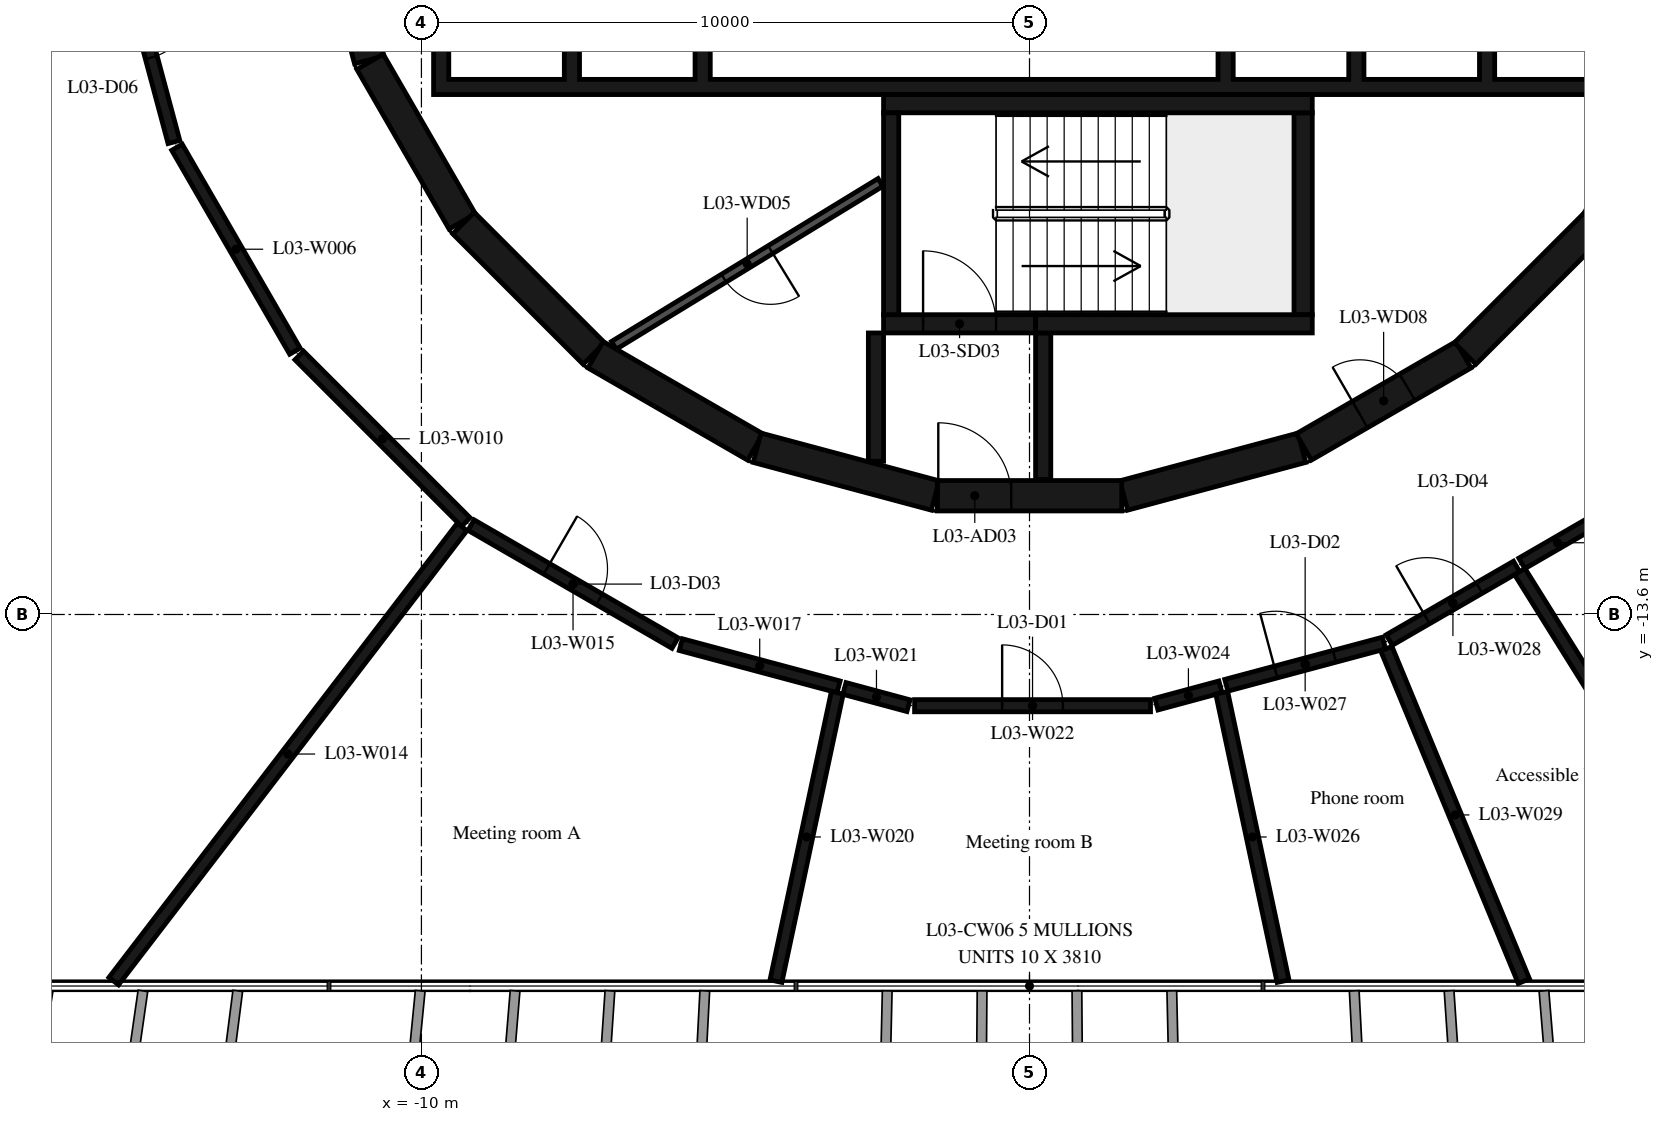
"""IFC4 building model, lengths in metres.
Left out: names, types, materials, properties, quantities, classifications, styles, units other than length and angle.
Written with IfcOpenShell. Run it as: python <this file> out.ifc"""

import sys

from ifc_helpers import new_model, si_unit, direction, frame, frame_2d, origin, place, context, subcontext, project, spatial, polyline, rectangle, outline, extrude, element, fill, save


model = new_model("IFC4")
c1 = context("Model", 3, precision=1e-05, world=origin(), true_north=direction((0.0, 1.0)))
c2 = subcontext(c1, "Body", "Model", "MODEL_VIEW")
j1 = project(units=[si_unit("LENGTHUNIT", "METRE"), si_unit("PLANEANGLEUNIT", "RADIAN")], contexts=[c1])
p1 = place(None, origin())
s1 = spatial("IfcSite", under=j1, at=p1, CompositionType="ELEMENT")
p2 = place(p1, origin())
s2 = spatial("IfcBuilding", under=s1, at=p2, CompositionType="ELEMENT")
p3 = place(p2, frame((0.0, 0.0, 18.6)))
s3 = spatial("IfcBuildingStorey", under=s2, at=p3, CompositionType="ELEMENT", Elevation=18.6)
p4 = place(p3, frame((1.55, -11.643, 0.0), z_axis=(0.0, 0.0, 1.0), x_axis=(0.965948410781, 0.258734743916, 0.0)))
e1 = element("IfcWall", 1, at=p4, inside=s3, PredefinedType="SHEAR", context=c2, shape_type="SweptSolid", body=[
    extrude(rectangle(XDim=3.033, YDim=0.5, at=frame_2d((1.516, 0.0))), origin(), (0.0, 0.0, 1.0), 4.42),
])
p5 = place(p3, frame((4.51, -10.845, 0.0), z_axis=(0.0, 0.0, 1.0), x_axis=(0.865975092491, 0.500087131594, 0.0)))
e2 = element("IfcWall", 2, at=p5, inside=s3, PredefinedType="SHEAR", context=c2, shape_type="SweptSolid", body=[
    extrude(rectangle(XDim=3.033, YDim=0.5, at=frame_2d((1.516, 0.0))), origin(), (0.0, 0.0, 1.0), 4.42),
])
p6 = place(p5, frame((1.066, 0.0, 0.0)))
e3 = element("IfcOpeningElement", 3, at=p6, cuts=e2, PredefinedType="OPENING", context=c2, shape_type="SweptSolid", body=[
    extrude(rectangle(XDim=0.9, YDim=2.1, at=frame_2d((0.45, 1.05))), frame((0.0, 0.26, 0.0), z_axis=(0.0, -1.0, 0.0), x_axis=(1.0, 0.0, 0.0)), (0.0, 0.0, 1.0), 0.52),
])
p7 = place(p3, frame((7.164, -9.308, 0.0), z_axis=(0.0, 0.0, 1.0), x_axis=(0.707106781187, 0.707106781187, 0.0)))
e4 = element("IfcWall", 4, at=p7, inside=s3, PredefinedType="SHEAR", context=c2, shape_type="SweptSolid", body=[
    extrude(rectangle(XDim=3.032, YDim=0.5, at=frame_2d((1.516, 0.0))), origin(), (0.0, 0.0, 1.0), 4.42),
])
p8 = place(p3, frame((9.329, -7.137, 0.0), z_axis=(0.0, 0.0, 1.0), x_axis=(0.500087131594, 0.865975092491, 0.0)))
e5 = element("IfcWall", 5, at=p8, inside=s3, PredefinedType="SHEAR", context=c2, shape_type="SweptSolid", body=[
    extrude(rectangle(XDim=3.033, YDim=0.5, at=frame_2d((1.516, 0.0))), origin(), (0.0, 0.0, 1.0), 4.42),
])
p9 = place(p3, frame((-11.643, -1.55, 0.0), z_axis=(0.0, 0.0, 1.0), x_axis=(0.258734743916, -0.965948410781, 0.0)))
e6 = element("IfcWall", 6, at=p9, inside=s3, PredefinedType="SHEAR", context=c2, shape_type="SweptSolid", body=[
    extrude(rectangle(XDim=3.033, YDim=0.5, at=frame_2d((1.516, 0.0))), origin(), (0.0, 0.0, 1.0), 4.42),
])
p10 = place(p9, frame((1.066, 0.0, 0.0)))
e7 = element("IfcOpeningElement", 7, at=p10, cuts=e6, PredefinedType="OPENING", context=c2, shape_type="SweptSolid", body=[
    extrude(rectangle(XDim=0.9, YDim=2.1, at=frame_2d((0.45, 1.05))), frame((0.0, 0.26, 0.0), z_axis=(0.0, -1.0, 0.0), x_axis=(1.0, 0.0, 0.0)), (0.0, 0.0, 1.0), 0.52),
])
p11 = place(p3, frame((-10.845, -4.51, 0.0), z_axis=(0.0, 0.0, 1.0), x_axis=(0.500087131594, -0.865975092491, 0.0)))
e8 = element("IfcWall", 8, at=p11, inside=s3, PredefinedType="SHEAR", context=c2, shape_type="SweptSolid", body=[
    extrude(rectangle(XDim=3.033, YDim=0.5, at=frame_2d((1.516, 0.0))), origin(), (0.0, 0.0, 1.0), 4.42),
])
p12 = place(p3, frame((-9.308, -7.164, 0.0), z_axis=(0.0, 0.0, 1.0), x_axis=(0.707106781187, -0.707106781187, 0.0)))
e9 = element("IfcWall", 9, at=p12, inside=s3, PredefinedType="SHEAR", context=c2, shape_type="SweptSolid", body=[
    extrude(rectangle(XDim=3.032, YDim=0.5, at=frame_2d((1.516, 0.0))), origin(), (0.0, 0.0, 1.0), 4.42),
])
for number, where, z_axis, x_axis in (
    (10, (-7.137, -9.329, 0.0), (0.0, 0.0, 1.0), (0.866, -0.5, 0.0)),
    (11, (-4.479, -10.858, 0.0), (0.0, 0.0, 1.0), (0.966, -0.259, 0.0)),
):
    element("IfcWall", number, at=place(p3, frame(where, z_axis=z_axis, x_axis=x_axis)), inside=s3, PredefinedType="SHEAR", context=c2, shape_type="SweptSolid", body=[
        extrude(rectangle(XDim=3.033, YDim=0.5, at=frame_2d((1.516, 0.0))), origin(), (0.0, 0.0, 1.0), 4.42),
    ])
p13 = place(p3, frame((-1.516, -11.647, 0.0), z_axis=(0.0, 0.0, 1.0), x_axis=(1.0, 0.0, 0.0)))
e12 = element("IfcWall", 12, at=p13, inside=s3, PredefinedType="SHEAR", context=c2, shape_type="SweptSolid", body=[
    extrude(rectangle(XDim=3.033, YDim=0.5, at=frame_2d((1.516, 0.0))), origin(), (0.0, 0.0, 1.0), 4.42),
])
p14 = place(p13, frame((0.016, 0.0, 0.0)))
e13 = element("IfcOpeningElement", 13, at=p14, cuts=e12, PredefinedType="OPENING", context=c2, shape_type="SweptSolid", body=[
    extrude(rectangle(XDim=1.2, YDim=2.1, at=frame_2d((0.6, 1.05))), frame((0.0, 0.26, 0.0), z_axis=(0.0, -1.0, 0.0), x_axis=(1.0, 0.0, 0.0)), (0.0, 0.0, 1.0), 0.52),
])
p15 = place(p3, frame((-2.275, -8.67, 0.0), z_axis=(0.0, 0.0, 1.0), x_axis=(0.0, 1.0, 0.0)))
e14 = element("IfcWall", 14, at=p15, inside=s3, PredefinedType="SHEAR", context=c2, shape_type="SweptSolid", body=[
    extrude(rectangle(XDim=3.32, YDim=0.25, at=frame_2d((1.66, 0.0))), origin(), (0.0, 0.0, 1.0), 4.42),
])
p16 = place(p3, frame((-2.4, -5.2, 0.0), z_axis=(0.0, 0.0, 1.0), x_axis=(1.0, 0.0, 0.0)))
e15 = element("IfcWall", 15, at=p16, inside=s3, PredefinedType="SHEAR", context=c2, shape_type="SweptSolid", body=[
    extrude(rectangle(XDim=7.05, YDim=0.3, at=frame_2d((3.525, 0.0))), origin(), (0.0, 0.0, 1.0), 4.42),
])
p17 = place(p3, frame((4.5, -8.67, 0.0), z_axis=(0.0, 0.0, 1.0), x_axis=(0.0, 1.0, 0.0)))
e16 = element("IfcWall", 16, at=p17, inside=s3, PredefinedType="SHEAR", context=c2, shape_type="SweptSolid", body=[
    extrude(rectangle(XDim=3.32, YDim=0.3, at=frame_2d((1.66, 0.0))), origin(), (0.0, 0.0, 1.0), 4.42),
])
p18 = place(p3, frame((0.1, -8.82, 0.0), z_axis=(0.0, 0.0, 1.0), x_axis=(1.0, 0.0, 0.0)))
e17 = element("IfcWall", 17, at=p18, inside=s3, PredefinedType="SHEAR", context=c2, shape_type="SweptSolid", body=[
    extrude(rectangle(XDim=4.55, YDim=0.3, at=frame_2d((2.275, 0.0))), origin(), (0.0, 0.0, 1.0), 4.42),
])
p19 = place(p3, frame((-2.4, -8.82, 0.0), z_axis=(0.0, 0.0, 1.0), x_axis=(1.0, 0.0, 0.0)))
e18 = element("IfcWall", 18, at=p19, inside=s3, PredefinedType="SHEAR", context=c2, shape_type="SweptSolid", body=[
    extrude(rectangle(XDim=2.5, YDim=0.3, at=frame_2d((1.25, 0.0))), origin(), (0.0, 0.0, 1.0), 4.42),
])
p20 = place(p19, frame((0.65, 0.0, 0.0)))
e19 = element("IfcOpeningElement", 19, at=p20, cuts=e18, PredefinedType="OPENING", context=c2, shape_type="SweptSolid", body=[
    extrude(rectangle(XDim=1.2, YDim=2.1, at=frame_2d((0.6, 1.05))), frame((0.0, 0.16, 0.0), z_axis=(0.0, -1.0, 0.0), x_axis=(1.0, 0.0, 0.0)), (0.0, 0.0, 1.0), 0.32),
])
p21 = place(p3, frame((-2.525, -8.97, 0.0), z_axis=(0.0, 0.0, 1.0), x_axis=(0.0, -1.0, 0.0)))
e20 = element("IfcWall", 20, at=p21, inside=s3, PredefinedType="SHEAR", context=c2, shape_type="SweptSolid", body=[
    extrude(rectangle(XDim=2.11, YDim=0.25, at=frame_2d((1.055, 0.0))), origin(), (0.0, 0.0, 1.0), 4.42),
])
p22 = place(p3, frame((0.225, -8.97, 0.0), z_axis=(0.0, 0.0, 1.0), x_axis=(0.0, -1.0, 0.0)))
e21 = element("IfcWall", 21, at=p22, inside=s3, PredefinedType="SHEAR", context=c2, shape_type="SweptSolid", body=[
    extrude(rectangle(XDim=2.41, YDim=0.25, at=frame_2d((1.205, 0.0))), origin(), (0.0, 0.0, 1.0), 4.42),
])
p23 = place(p3, origin())
e22 = element("IfcWall", 22, at=p23, inside=s3, PredefinedType="SHEAR", context=c2, shape_type="SweptSolid", body=[
    extrude(outline(polyline([(9.8, -5.05), (9.8, -4.8), (9.8, -1.9), (9.55, -1.9), (9.55, -4.8), (7.65, -4.8), (7.65, -1.9), (7.4, -1.9), (7.4, -4.8), (5.5, -4.8), (5.5, -1.9), (5.25, -1.9), (5.25, -4.8), (3.35, -4.8), (3.35, -1.9), (3.1, -1.9), (3.1, -4.8), (-5.25, -4.8), (-5.25, -1.9), (-5.5, -1.9), (-5.5, -4.8), (-7.4, -4.8), (-7.4, -1.9), (-7.65, -1.9), (-7.65, -4.8), (-9.55, -4.8), (-9.55, -1.9), (-9.8, -1.9), (-9.8, -4.8), (-9.8, -5.05), (9.8, -5.05)])), origin(), (0.0, 0.0, 1.0), 4.42),
])
p24 = place(p3, frame((-2.451, -6.495, 0.0), z_axis=(0.0, 0.0, 1.0), x_axis=(-0.853250115418, -0.521501908471, 0.0)))
e23 = element("IfcWall", 23, at=p24, inside=s3, PredefinedType="PARTITIONING", context=c2, shape_type="SweptSolid", body=[
    extrude(rectangle(XDim=5.137, YDim=0.15, at=frame_2d((2.569, 0.0))), origin(), (0.0, 0.0, 1.0), 4.42),
])
p25 = place(p24, frame((2.119, 0.0, 0.0)))
e24 = element("IfcOpeningElement", 24, at=p25, cuts=e23, PredefinedType="OPENING", context=c2, shape_type="SweptSolid", body=[
    extrude(rectangle(XDim=0.9, YDim=2.1, at=frame_2d((0.45, 1.05))), frame((0.0, 0.085, 0.0), z_axis=(0.0, -1.0, 0.0), x_axis=(1.0, 0.0, 0.0)), (0.0, 0.0, 1.0), 0.17),
])
p26 = place(p3, frame((-15.074, -2.087, 0.0), z_axis=(0.0, 0.0, 1.0), x_axis=(0.259026804199, -0.965870133458, 0.0)))
e25 = element("IfcWall", 25, at=p26, inside=s3, PredefinedType="PARTITIONING", context=c2, shape_type="SweptSolid", body=[
    extrude(rectangle(XDim=3.876, YDim=0.2, at=frame_2d((1.938, 0.0))), origin(), (0.0, 0.0, 1.0), 4.42),
])
p27 = place(p26, frame((1.438, 0.0, 0.0)))
e26 = element("IfcOpeningElement", 26, at=p27, cuts=e25, PredefinedType="OPENING", context=c2, shape_type="SweptSolid", body=[
    extrude(rectangle(XDim=1.0, YDim=2.1, at=frame_2d((0.5, 1.05))), frame((0.0, 0.11, 0.0), z_axis=(0.0, -1.0, 0.0), x_axis=(1.0, 0.0, 0.0)), (0.0, 0.0, 1.0), 0.22),
])
p28 = place(p3, frame((-14.02, -5.917, 0.0), z_axis=(0.0, 0.0, 1.0), x_axis=(0.500733182901, -0.865601686425, 0.0)))
e27 = element("IfcWall", 27, at=p28, inside=s3, PredefinedType="PARTITIONING", context=c2, shape_type="SweptSolid", body=[
    extrude(rectangle(XDim=3.874, YDim=0.2, at=frame_2d((1.937, 0.0))), origin(), (0.0, 0.0, 1.0), 4.42),
])
p29 = place(p3, frame((-12.009, -9.341, 0.0), z_axis=(0.0, 0.0, 1.0), x_axis=(0.707106781187, -0.707106781187, 0.0)))
e28 = element("IfcWall", 28, at=p29, inside=s3, PredefinedType="PARTITIONING", context=c2, shape_type="SweptSolid", body=[
    extrude(rectangle(XDim=3.874, YDim=0.2, at=frame_2d((1.937, 0.0))), origin(), (0.0, 0.0, 1.0), 4.42),
])
p30 = place(p3, frame((-9.331, -12.159, 0.0), z_axis=(0.0, 0.0, 1.0), x_axis=(-0.608558385637, -0.793509099677, 0.0)))
e29 = element("IfcWall", 29, at=p30, inside=s3, PredefinedType="PARTITIONING", context=c2, shape_type="SweptSolid", body=[
    extrude(rectangle(XDim=9.415, YDim=0.2, at=frame_2d((4.707, 0.0))), origin(), (0.0, 0.0, 1.0), 4.42),
])
p31 = place(p3, frame((-9.183, -12.13, 0.0), z_axis=(0.0, 0.0, 1.0), x_axis=(0.865585884642, -0.500760497952, 0.0)))
e30 = element("IfcWall", 30, at=p31, inside=s3, PredefinedType="PARTITIONING", context=c2, shape_type="SweptSolid", body=[
    extrude(rectangle(XDim=3.874, YDim=0.2, at=frame_2d((1.937, 0.0))), origin(), (0.0, 0.0, 1.0), 4.42),
])
p32 = place(p31, frame((1.437, 0.0, 0.0)))
e31 = element("IfcOpeningElement", 31, at=p32, cuts=e30, PredefinedType="OPENING", context=c2, shape_type="SweptSolid", body=[
    extrude(rectangle(XDim=1.0, YDim=2.1, at=frame_2d((0.5, 1.05))), frame((0.0, 0.11, 0.0), z_axis=(0.0, -1.0, 0.0), x_axis=(1.0, 0.0, 0.0)), (0.0, 0.0, 1.0), 0.22),
])
p33 = place(p3, frame((-5.733, -14.096, 0.0), z_axis=(0.0, 0.0, 1.0), x_axis=(0.966003629213, -0.25852850587, 0.0)))
e32 = element("IfcWall", 32, at=p33, inside=s3, PredefinedType="PARTITIONING", context=c2, shape_type="SweptSolid", body=[
    extrude(rectangle(XDim=2.685, YDim=0.2, at=frame_2d((1.342, 0.0))), origin(), (0.0, 0.0, 1.0), 4.42),
])
p34 = place(p3, frame((-3.161, -14.888, 0.0), z_axis=(0.0, 0.0, 1.0), x_axis=(-0.208118919353, -0.978103530005, 0.0)))
e33 = element("IfcWall", 33, at=p34, inside=s3, PredefinedType="PARTITIONING", context=c2, shape_type="SweptSolid", body=[
    extrude(rectangle(XDim=4.848, YDim=0.2, at=frame_2d((2.424, 0.0))), origin(), (0.0, 0.0, 1.0), 4.42),
])
p35 = place(p3, frame((-3.043, -14.816, 0.0), z_axis=(0.0, 0.0, 1.0), x_axis=(0.965488181203, -0.260446869738, 0.0)))
e34 = element("IfcWall", 34, at=p35, inside=s3, PredefinedType="PARTITIONING", context=c2, shape_type="SweptSolid", body=[
    extrude(rectangle(XDim=1.091, YDim=0.2, at=frame_2d((0.545, 0.0))), origin(), (0.0, 0.0, 1.0), 4.42),
])
p36 = place(p3, frame((-1.89, -15.1, 0.0), z_axis=(0.0, 0.0, 1.0), x_axis=(1.0, 0.0, 0.0)))
e35 = element("IfcWall", 35, at=p36, inside=s3, PredefinedType="PARTITIONING", context=c2, shape_type="SweptSolid", body=[
    extrude(rectangle(XDim=3.88, YDim=0.2, at=frame_2d((1.94, 0.0))), origin(), (0.0, 0.0, 1.0), 4.42),
])
p37 = place(p36, frame((1.44, 0.0, 0.0)))
e36 = element("IfcOpeningElement", 36, at=p37, cuts=e35, PredefinedType="OPENING", context=c2, shape_type="SweptSolid", body=[
    extrude(rectangle(XDim=1.0, YDim=2.1, at=frame_2d((0.5, 1.05))), frame((0.0, 0.11, 0.0), z_axis=(0.0, -1.0, 0.0), x_axis=(1.0, 0.0, 0.0)), (0.0, 0.0, 1.0), 0.22),
])
p38 = place(p3, frame((2.087, -15.074, 0.0), z_axis=(0.0, 0.0, 1.0), x_axis=(0.965529267024, 0.260294514963, 0.0)))
e37 = element("IfcWall", 37, at=p38, inside=s3, PredefinedType="PARTITIONING", context=c2, shape_type="SweptSolid", body=[
    extrude(rectangle(XDim=1.091, YDim=0.2, at=frame_2d((0.545, 0.0))), origin(), (0.0, 0.0, 1.0), 4.42),
])
p39 = place(p3, frame((3.161, -14.888, 0.0), z_axis=(0.0, 0.0, 1.0), x_axis=(0.208118919353, -0.978103530005, 0.0)))
e38 = element("IfcWall", 38, at=p39, inside=s3, PredefinedType="PARTITIONING", context=c2, shape_type="SweptSolid", body=[
    extrude(rectangle(XDim=4.848, YDim=0.2, at=frame_2d((2.424, 0.0))), origin(), (0.0, 0.0, 1.0), 4.42),
])
p40 = place(p3, frame((3.237, -14.764, 0.0), z_axis=(0.0, 0.0, 1.0), x_axis=(0.966003629213, 0.25852850587, 0.0)))
e39 = element("IfcWall", 39, at=p40, inside=s3, PredefinedType="PARTITIONING", context=c2, shape_type="SweptSolid", body=[
    extrude(rectangle(XDim=2.685, YDim=0.2, at=frame_2d((1.342, 0.0))), origin(), (0.0, 0.0, 1.0), 4.42),
])
p41 = place(p40, frame((0.842, 0.0, 0.0)))
e40 = element("IfcOpeningElement", 40, at=p41, cuts=e39, PredefinedType="OPENING", context=c2, shape_type="SweptSolid", body=[
    extrude(rectangle(XDim=1.0, YDim=2.1, at=frame_2d((0.5, 1.05))), frame((0.0, 0.11, 0.0), z_axis=(0.0, -1.0, 0.0), x_axis=(1.0, 0.0, 0.0)), (0.0, 0.0, 1.0), 0.22),
])
p42 = place(p3, frame((5.917, -14.02, 0.0), z_axis=(0.0, 0.0, 1.0), x_axis=(0.865797030805, 0.500395345151, 0.0)))
e41 = element("IfcWall", 41, at=p42, inside=s3, PredefinedType="PARTITIONING", context=c2, shape_type="SweptSolid", body=[
    extrude(rectangle(XDim=2.418, YDim=0.2, at=frame_2d((1.209, 0.0))), origin(), (0.0, 0.0, 1.0), 4.42),
])
p43 = place(p42, frame((0.709, 0.0, 0.0)))
e42 = element("IfcOpeningElement", 42, at=p43, cuts=e41, PredefinedType="OPENING", context=c2, shape_type="SweptSolid", body=[
    extrude(rectangle(XDim=1.0, YDim=2.1, at=frame_2d((0.5, 1.05))), frame((0.0, 0.11, 0.0), z_axis=(0.0, -1.0, 0.0), x_axis=(1.0, 0.0, 0.0)), (0.0, 0.0, 1.0), 0.22),
])
p44 = place(p3, frame((5.868, -14.162, 0.0), z_axis=(0.0, 0.0, 1.0), x_axis=(0.382249745869, -0.924059052108, 0.0)))
e43 = element("IfcWall", 43, at=p44, inside=s3, PredefinedType="PARTITIONING", context=c2, shape_type="SweptSolid", body=[
    extrude(rectangle(XDim=5.917, YDim=0.2, at=frame_2d((2.958, 0.0))), origin(), (0.0, 0.0, 1.0), 4.42),
])
p45 = place(p3, frame((8.096, -12.76, 0.0), z_axis=(0.0, 0.0, 1.0), x_axis=(0.865348217229, 0.501171091484, 0.0)))
e44 = element("IfcWall", 44, at=p45, inside=s3, PredefinedType="PARTITIONING", context=c2, shape_type="SweptSolid", body=[
    extrude(rectangle(XDim=1.356, YDim=0.2, at=frame_2d((0.678, 0.0))), origin(), (0.0, 0.0, 1.0), 4.42),
])
p46 = place(p3, frame((8.063, -12.895, 0.0), z_axis=(0.0, 0.0, 1.0), x_axis=(0.529780605496, -0.848134723992, 0.0)))
e45 = element("IfcWall", 45, at=p46, inside=s3, PredefinedType="PARTITIONING", context=c2, shape_type="SweptSolid", body=[
    extrude(rectangle(XDim=7.941, YDim=0.2, at=frame_2d((3.971, 0.0))), origin(), (0.0, 0.0, 1.0), 4.42),
])
p47 = place(p20, origin())
e46 = element("IfcDoor", 46, at=p47, inside=s3, OperationType="SINGLE_SWING_LEFT", PredefinedType="DOOR", context=c2, shape_type="SweptSolid", body=[
    extrude(rectangle(XDim=1.2, YDim=2.1, at=frame_2d((0.6, 1.05))), frame((0.0, 0.025, 0.0), z_axis=(0.0, -1.0, 0.0), x_axis=(1.0, 0.0, 0.0)), (0.0, 0.0, 1.0), 0.05),
])
fill(e19, e46)
p48 = place(p14, origin())
e47 = element("IfcDoor", 47, at=p48, inside=s3, OperationType="SINGLE_SWING_RIGHT", PredefinedType="DOOR", context=c2, shape_type="SweptSolid", body=[
    extrude(rectangle(XDim=1.2, YDim=2.1, at=frame_2d((0.6, 1.05))), frame((0.0, 0.025, 0.0), z_axis=(0.0, -1.0, 0.0), x_axis=(1.0, 0.0, 0.0)), (0.0, 0.0, 1.0), 0.05),
])
fill(e13, e47)
p49 = place(p25, origin())
e48 = element("IfcDoor", 48, at=p49, inside=s3, OperationType="SINGLE_SWING_RIGHT", PredefinedType="DOOR", context=c2, shape_type="SweptSolid", body=[
    extrude(rectangle(XDim=0.9, YDim=2.1, at=frame_2d((0.45, 1.05))), frame((0.0, 0.025, 0.0), z_axis=(0.0, -1.0, 0.0), x_axis=(1.0, 0.0, 0.0)), (0.0, 0.0, 1.0), 0.05),
])
fill(e24, e48)
p50 = place(p6, origin())
e49 = element("IfcDoor", 49, at=p50, inside=s3, OperationType="SINGLE_SWING_LEFT", PredefinedType="DOOR", context=c2, shape_type="SweptSolid", body=[
    extrude(rectangle(XDim=0.9, YDim=2.1, at=frame_2d((0.45, 1.05))), frame((0.0, 0.025, 0.0), z_axis=(0.0, -1.0, 0.0), x_axis=(1.0, 0.0, 0.0)), (0.0, 0.0, 1.0), 0.05),
])
fill(e3, e49)
p51 = place(p37, origin())
e50 = element("IfcDoor", 50, at=p51, inside=s3, OperationType="SINGLE_SWING_LEFT", PredefinedType="DOOR", context=c2, shape_type="SweptSolid", body=[
    extrude(rectangle(XDim=1.0, YDim=2.1, at=frame_2d((0.5, 1.05))), frame((0.0, 0.025, 0.0), z_axis=(0.0, -1.0, 0.0), x_axis=(1.0, 0.0, 0.0)), (0.0, 0.0, 1.0), 0.05),
])
fill(e36, e50)
p52 = place(p41, origin())
e51 = element("IfcDoor", 51, at=p52, inside=s3, OperationType="SINGLE_SWING_LEFT", PredefinedType="DOOR", context=c2, shape_type="SweptSolid", body=[
    extrude(rectangle(XDim=1.0, YDim=2.1, at=frame_2d((0.5, 1.05))), frame((0.0, 0.025, 0.0), z_axis=(0.0, -1.0, 0.0), x_axis=(1.0, 0.0, 0.0)), (0.0, 0.0, 1.0), 0.05),
])
fill(e40, e51)
p53 = place(p32, origin())
e52 = element("IfcDoor", 52, at=p53, inside=s3, OperationType="SINGLE_SWING_LEFT", PredefinedType="DOOR", context=c2, shape_type="SweptSolid", body=[
    extrude(rectangle(XDim=1.0, YDim=2.1, at=frame_2d((0.5, 1.05))), frame((0.0, 0.025, 0.0), z_axis=(0.0, -1.0, 0.0), x_axis=(1.0, 0.0, 0.0)), (0.0, 0.0, 1.0), 0.05),
])
fill(e31, e52)
p54 = place(p43, origin())
e53 = element("IfcDoor", 53, at=p54, inside=s3, OperationType="SINGLE_SWING_LEFT", PredefinedType="DOOR", context=c2, shape_type="SweptSolid", body=[
    extrude(rectangle(XDim=1.0, YDim=2.1, at=frame_2d((0.5, 1.05))), frame((0.0, 0.025, 0.0), z_axis=(0.0, -1.0, 0.0), x_axis=(1.0, 0.0, 0.0)), (0.0, 0.0, 1.0), 0.05),
])
fill(e42, e53)
p55 = place(p27, origin())
e54 = element("IfcDoor", 54, at=p55, inside=s3, OperationType="SINGLE_SWING_LEFT", PredefinedType="DOOR", context=c2, shape_type="SweptSolid", body=[
    extrude(rectangle(XDim=1.0, YDim=2.1, at=frame_2d((0.5, 1.05))), frame((0.0, 0.025, 0.0), z_axis=(0.0, -1.0, 0.0), x_axis=(1.0, 0.0, 0.0)), (0.0, 0.0, 1.0), 0.05),
])
fill(e26, e54)
save(model, sys.argv[1])
